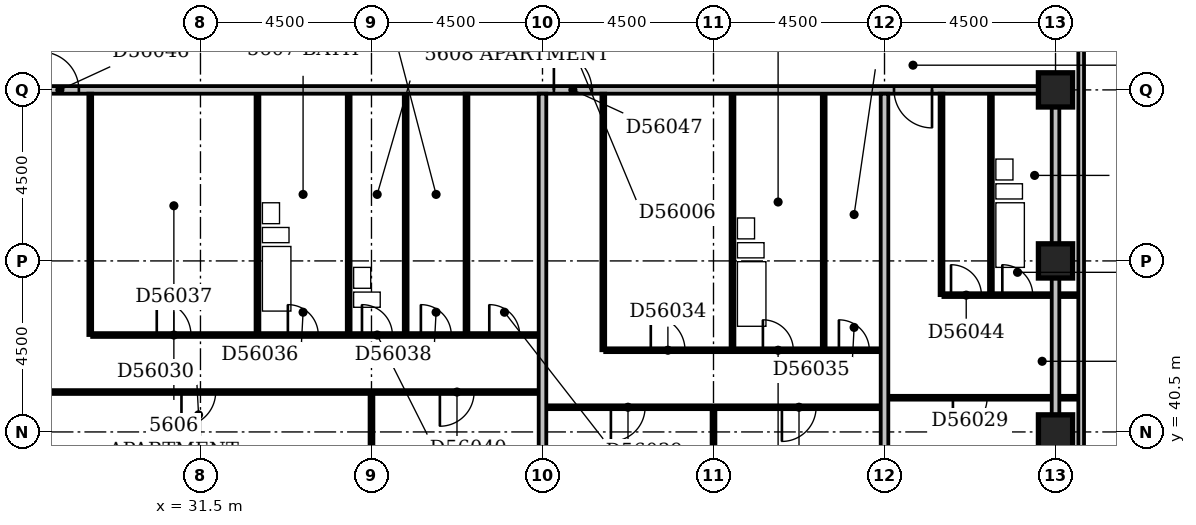
"""IFC4 building model, lengths in metres.
Left out: names, types, materials, properties, quantities, classifications, styles, units other than length and angle.
Written with IfcOpenShell. Run it as: python <this file> out.ifc"""

import sys

from ifc_helpers import new_model, si_unit, direction, frame, frame_2d, origin, origin_2d, place, context, subcontext, project, spatial, rectangle, extrude, element, fill, save


model = new_model("IFC4")
c1 = context("Model", 3, precision=1e-05, world=origin(), true_north=direction((0.0, 1.0)))
c2 = subcontext(c1, "Body", "Model", "MODEL_VIEW")
j1 = project(units=[si_unit("LENGTHUNIT", "METRE"), si_unit("PLANEANGLEUNIT", "RADIAN")], contexts=[c1])
p1 = place(None, origin())
s1 = spatial("IfcSite", under=j1, at=p1, CompositionType="ELEMENT")
p2 = place(p1, origin())
s2 = spatial("IfcBuilding", under=s1, at=p2, CompositionType="ELEMENT")
p3 = place(p2, frame((0.0, 0.0, 218.6)))
s3 = spatial("IfcBuildingStorey", under=s2, at=p3, CompositionType="ELEMENT", Elevation=218.6)
for number, where, z_axis, x_axis in (
    (1, (54.0, 40.5, -0.3), (0.0, 0.0, 1.0), (1.0, 0.0, 0.0)),
    (2, (54.0, 45.0, -0.3), (0.0, 0.0, 1.0), (1.0, 0.0, 0.0)),
    (3, (54.0, 49.5, -0.3), (0.0, 0.0, 1.0), (1.0, 0.0, 0.0)),
):
    element("IfcColumn", number, at=place(p3, frame(where, z_axis=z_axis, x_axis=x_axis)), inside=s3, PredefinedType="COLUMN", context=c2, shape_type="SweptSolid", body=[
        extrude(rectangle(XDim=0.9, YDim=0.9, at=origin_2d()), origin(), (0.0, 0.0, 1.0), 3.6),
    ])
p4 = place(p3, frame((54.675, 39.9, 0.0), z_axis=(0.0, 0.0, 1.0), x_axis=(0.0, 1.0, 0.0)))
e4 = element("IfcWall", 4, at=p4, inside=s3, PredefinedType="STANDARD", context=c2, shape_type="SweptSolid", body=[
    extrude(rectangle(XDim=14.85, YDim=0.15, at=frame_2d((7.425, 0.0))), origin(), (0.0, 0.0, 1.0), 2.7),
])
p5 = place(p3, frame((36.0, 36.45, 0.0), z_axis=(0.0, 0.0, 1.0), x_axis=(0.0, 1.0, 0.0)))
e5 = element("IfcWall", 5, at=p5, inside=s3, PredefinedType="PARTITIONING", context=c2, shape_type="SweptSolid", body=[
    extrude(rectangle(XDim=5.05, YDim=0.1, at=frame_2d((2.525, 0.0))), origin(), (0.0, 0.0, 1.0), 2.4),
])
p6 = place(p3, frame((40.5, 36.45, 0.0), z_axis=(0.0, 0.0, 1.0), x_axis=(0.0, 1.0, 0.0)))
e6 = element("IfcWall", 6, at=p6, inside=s3, PredefinedType="PARTITIONING", context=c2, shape_type="SweptSolid", body=[
    extrude(rectangle(XDim=12.95, YDim=0.2, at=frame_2d((6.475, 0.0))), origin(), (0.0, 0.0, 1.0), 3.3),
])
p7 = place(p3, frame((45.0, 36.45, 0.0), z_axis=(0.0, 0.0, 1.0), x_axis=(0.0, 1.0, 0.0)))
e7 = element("IfcWall", 7, at=p7, inside=s3, PredefinedType="PARTITIONING", context=c2, shape_type="SweptSolid", body=[
    extrude(rectangle(XDim=4.65, YDim=0.1, at=frame_2d((2.325, 0.0))), origin(), (0.0, 0.0, 1.0), 2.6),
])
p8 = place(p3, frame((49.5, 36.45, 0.0), z_axis=(0.0, 0.0, 1.0), x_axis=(0.0, 1.0, 0.0)))
e8 = element("IfcWall", 8, at=p8, inside=s3, PredefinedType="PARTITIONING", context=c2, shape_type="SweptSolid", body=[
    extrude(rectangle(XDim=12.95, YDim=0.2, at=frame_2d((6.475, 0.0))), origin(), (0.0, 0.0, 1.0), 3.3),
])
p9 = place(p3, frame((54.0, 40.95, 0.0), z_axis=(0.0, 0.0, 1.0), x_axis=(0.0, 1.0, 0.0)))
e9 = element("IfcWall", 9, at=p9, inside=s3, PredefinedType="PARTITIONING", context=c2, shape_type="SweptSolid", body=[
    extrude(rectangle(XDim=8.1, YDim=0.2, at=frame_2d((4.05, 0.0))), origin(), (0.0, 0.0, 1.0), 2.7),
])
p10 = place(p3, frame((40.6, 41.15, 0.0), z_axis=(0.0, 0.0, 1.0), x_axis=(1.0, 0.0, 0.0)))
e10 = element("IfcWall", 10, at=p10, inside=s3, PredefinedType="PARTITIONING", context=c2, shape_type="SweptSolid", body=[
    extrude(rectangle(XDim=8.8, YDim=0.1, at=frame_2d((4.4, 0.0))), origin(), (0.0, 0.0, 1.0), 3.3),
])
p11 = place(p10, frame((1.7, 0.0, 0.0)))
e11 = element("IfcOpeningElement", 11, at=p11, cuts=e10, PredefinedType="OPENING", context=c2, shape_type="SweptSolid", body=[
    extrude(rectangle(XDim=0.9, YDim=2.1, at=frame_2d((0.45, 1.05))), frame((0.0, 0.062, 0.0), z_axis=(0.0, -1.0, 0.0), x_axis=(1.0, 0.0, 0.0)), (0.0, 0.0, 1.0), 0.124),
])
p12 = place(p10, frame((6.2, 0.0, 0.0)))
e12 = element("IfcOpeningElement", 12, at=p12, cuts=e10, PredefinedType="OPENING", context=c2, shape_type="SweptSolid", body=[
    extrude(rectangle(XDim=0.9, YDim=2.1, at=frame_2d((0.45, 1.05))), frame((0.0, 0.062, 0.0), z_axis=(0.0, -1.0, 0.0), x_axis=(1.0, 0.0, 0.0)), (0.0, 0.0, 1.0), 0.124),
])
p13 = place(p3, frame((49.6, 41.4, 0.0), z_axis=(0.0, 0.0, 1.0), x_axis=(1.0, 0.0, 0.0)))
e13 = element("IfcWall", 13, at=p13, inside=s3, PredefinedType="PARTITIONING", context=c2, shape_type="SweptSolid", body=[
    extrude(rectangle(XDim=5.0, YDim=0.1, at=frame_2d((2.5, 0.0))), origin(), (0.0, 0.0, 1.0), 3.3),
])
p14 = place(p13, frame((1.7, 0.0, 0.0)))
e14 = element("IfcOpeningElement", 14, at=p14, cuts=e13, PredefinedType="OPENING", context=c2, shape_type="SweptSolid", body=[
    extrude(rectangle(XDim=0.9, YDim=2.1, at=frame_2d((0.45, 1.05))), frame((0.0, 0.062, 0.0), z_axis=(0.0, -1.0, 0.0), x_axis=(1.0, 0.0, 0.0)), (0.0, 0.0, 1.0), 0.124),
])
p15 = place(p3, frame((27.1, 41.55, 0.0), z_axis=(0.0, 0.0, 1.0), x_axis=(1.0, 0.0, 0.0)))
e15 = element("IfcWall", 15, at=p15, inside=s3, PredefinedType="PARTITIONING", context=c2, shape_type="SweptSolid", body=[
    extrude(rectangle(XDim=13.3, YDim=0.1, at=frame_2d((6.65, 0.0))), origin(), (0.0, 0.0, 1.0), 3.3),
])
p16 = place(p15, frame((3.9, 0.0, 0.0)))
e16 = element("IfcOpeningElement", 16, at=p16, cuts=e15, PredefinedType="OPENING", context=c2, shape_type="SweptSolid", body=[
    extrude(rectangle(XDim=0.9, YDim=2.1, at=frame_2d((0.45, 1.05))), frame((0.0, 0.062, 0.0), z_axis=(0.0, -1.0, 0.0), x_axis=(1.0, 0.0, 0.0)), (0.0, 0.0, 1.0), 0.124),
])
p17 = place(p15, frame((10.7, 0.0, 0.0)))
e17 = element("IfcOpeningElement", 17, at=p17, cuts=e15, PredefinedType="OPENING", context=c2, shape_type="SweptSolid", body=[
    extrude(rectangle(XDim=0.9, YDim=2.1, at=frame_2d((0.45, 1.05))), frame((0.0, 0.062, 0.0), z_axis=(0.0, -1.0, 0.0), x_axis=(1.0, 0.0, 0.0)), (0.0, 0.0, 1.0), 0.124),
])
p18 = place(p3, frame((42.1, 42.65, 0.0), z_axis=(0.0, 0.0, 1.0), x_axis=(0.0, 1.0, 0.0)))
e18 = element("IfcWall", 18, at=p18, inside=s3, PredefinedType="PARTITIONING", context=c2, shape_type="SweptSolid", body=[
    extrude(rectangle(XDim=6.75, YDim=0.1, at=frame_2d((3.375, 0.0))), origin(), (0.0, 0.0, 1.0), 3.3),
])
p19 = place(p3, frame((42.15, 42.65, 0.0), z_axis=(0.0, 0.0, 1.0), x_axis=(1.0, 0.0, 0.0)))
e19 = element("IfcWall", 19, at=p19, inside=s3, PredefinedType="PARTITIONING", context=c2, shape_type="SweptSolid", body=[
    extrude(rectangle(XDim=7.25, YDim=0.1, at=frame_2d((3.625, 0.0))), origin(), (0.0, 0.0, 1.0), 3.3),
])
p20 = place(p19, frame((4.15, 0.0, 0.0)))
e20 = element("IfcOpeningElement", 20, at=p20, cuts=e19, PredefinedType="OPENING", context=c2, shape_type="SweptSolid", body=[
    extrude(rectangle(XDim=0.8, YDim=2.1, at=frame_2d((0.4, 1.05))), frame((0.0, 0.062, 0.0), z_axis=(0.0, -1.0, 0.0), x_axis=(1.0, 0.0, 0.0)), (0.0, 0.0, 1.0), 0.124),
])
p21 = place(p19, frame((1.2, 0.0, 0.0)))
e21 = element("IfcOpeningElement", 21, at=p21, cuts=e19, PredefinedType="OPENING", context=c2, shape_type="SweptSolid", body=[
    extrude(rectangle(XDim=0.9, YDim=2.1, at=frame_2d((0.45, 1.05))), frame((0.0, 0.062, 0.0), z_axis=(0.0, -1.0, 0.0), x_axis=(1.0, 0.0, 0.0)), (0.0, 0.0, 1.0), 0.124),
])
p22 = place(p19, frame((6.15, 0.0, 0.0)))
e22 = element("IfcOpeningElement", 22, at=p22, cuts=e19, PredefinedType="OPENING", context=c2, shape_type="SweptSolid", body=[
    extrude(rectangle(XDim=0.8, YDim=2.1, at=frame_2d((0.4, 1.05))), frame((0.0, 0.062, 0.0), z_axis=(0.0, -1.0, 0.0), x_axis=(1.0, 0.0, 0.0)), (0.0, 0.0, 1.0), 0.124),
])
p23 = place(p3, frame((45.5, 42.7, 0.0), z_axis=(0.0, 0.0, 1.0), x_axis=(0.0, 1.0, 0.0)))
e23 = element("IfcWall", 23, at=p23, inside=s3, PredefinedType="PLUMBINGWALL", context=c2, shape_type="SweptSolid", body=[
    extrude(rectangle(XDim=6.7, YDim=0.1, at=frame_2d((3.35, 0.0))), origin(), (0.0, 0.0, 1.0), 2.6),
])
p24 = place(p3, frame((47.9, 42.7, 0.0), z_axis=(0.0, 0.0, 1.0), x_axis=(0.0, 1.0, 0.0)))
e24 = element("IfcWall", 24, at=p24, inside=s3, PredefinedType="PLUMBINGWALL", context=c2, shape_type="SweptSolid", body=[
    extrude(rectangle(XDim=6.7, YDim=0.1, at=frame_2d((3.35, 0.0))), origin(), (0.0, 0.0, 1.0), 3.3),
])
p25 = place(p3, frame((28.6, 43.05, 0.0), z_axis=(0.0, 0.0, 1.0), x_axis=(0.0, 1.0, 0.0)))
e25 = element("IfcWall", 25, at=p25, inside=s3, PredefinedType="PARTITIONING", context=c2, shape_type="SweptSolid", body=[
    extrude(rectangle(XDim=6.35, YDim=0.1, at=frame_2d((3.175, 0.0))), origin(), (0.0, 0.0, 1.0), 3.3),
])
p26 = place(p3, frame((28.65, 43.05, 0.0), z_axis=(0.0, 0.0, 1.0), x_axis=(1.0, 0.0, 0.0)))
e26 = element("IfcWall", 26, at=p26, inside=s3, PredefinedType="PARTITIONING", context=c2, shape_type="SweptSolid", body=[
    extrude(rectangle(XDim=11.75, YDim=0.1, at=frame_2d((5.875, 0.0))), origin(), (0.0, 0.0, 1.0), 3.3),
])
p27 = place(p26, frame((5.15, 0.0, 0.0)))
e27 = element("IfcOpeningElement", 27, at=p27, cuts=e26, PredefinedType="OPENING", context=c2, shape_type="SweptSolid", body=[
    extrude(rectangle(XDim=0.8, YDim=2.1, at=frame_2d((0.4, 1.05))), frame((0.0, 0.062, 0.0), z_axis=(0.0, -1.0, 0.0), x_axis=(1.0, 0.0, 0.0)), (0.0, 0.0, 1.0), 0.124),
])
p28 = place(p26, frame((1.7, 0.0, 0.0)))
e28 = element("IfcOpeningElement", 28, at=p28, cuts=e26, PredefinedType="OPENING", context=c2, shape_type="SweptSolid", body=[
    extrude(rectangle(XDim=0.9, YDim=2.1, at=frame_2d((0.45, 1.05))), frame((0.0, 0.062, 0.0), z_axis=(0.0, -1.0, 0.0), x_axis=(1.0, 0.0, 0.0)), (0.0, 0.0, 1.0), 0.124),
])
p29 = place(p26, frame((8.65, 0.0, 0.0)))
e29 = element("IfcOpeningElement", 29, at=p29, cuts=e26, PredefinedType="OPENING", context=c2, shape_type="SweptSolid", body=[
    extrude(rectangle(XDim=0.8, YDim=2.1, at=frame_2d((0.4, 1.05))), frame((0.0, 0.062, 0.0), z_axis=(0.0, -1.0, 0.0), x_axis=(1.0, 0.0, 0.0)), (0.0, 0.0, 1.0), 0.124),
])
p30 = place(p26, frame((10.45, 0.0, 0.0)))
e30 = element("IfcOpeningElement", 30, at=p30, cuts=e26, PredefinedType="OPENING", context=c2, shape_type="SweptSolid", body=[
    extrude(rectangle(XDim=0.8, YDim=2.1, at=frame_2d((0.4, 1.05))), frame((0.0, 0.062, 0.0), z_axis=(0.0, -1.0, 0.0), x_axis=(1.0, 0.0, 0.0)), (0.0, 0.0, 1.0), 0.124),
])
p31 = place(p26, frame((7.1, 0.0, 0.0)))
e31 = element("IfcOpeningElement", 31, at=p31, cuts=e26, PredefinedType="OPENING", context=c2, shape_type="SweptSolid", body=[
    extrude(rectangle(XDim=0.8, YDim=2.1, at=frame_2d((0.4, 1.05))), frame((0.0, 0.062, 0.0), z_axis=(0.0, -1.0, 0.0), x_axis=(1.0, 0.0, 0.0)), (0.0, 0.0, 1.0), 0.124),
])
p32 = place(p3, frame((33.0, 43.1, 0.0), z_axis=(0.0, 0.0, 1.0), x_axis=(0.0, 1.0, 0.0)))
e32 = element("IfcWall", 32, at=p32, inside=s3, PredefinedType="PLUMBINGWALL", context=c2, shape_type="SweptSolid", body=[
    extrude(rectangle(XDim=6.3, YDim=0.1, at=frame_2d((3.15, 0.0))), origin(), (0.0, 0.0, 1.0), 3.3),
])
p33 = place(p3, frame((35.4, 43.1, 0.0), z_axis=(0.0, 0.0, 1.0), x_axis=(0.0, 1.0, 0.0)))
e33 = element("IfcWall", 33, at=p33, inside=s3, PredefinedType="PLUMBINGWALL", context=c2, shape_type="SweptSolid", body=[
    extrude(rectangle(XDim=6.3, YDim=0.1, at=frame_2d((3.15, 0.0))), origin(), (0.0, 0.0, 1.0), 2.4),
])
p34 = place(p3, frame((36.9, 43.1, 0.0), z_axis=(0.0, 0.0, 1.0), x_axis=(0.0, 1.0, 0.0)))
e34 = element("IfcWall", 34, at=p34, inside=s3, PredefinedType="PLUMBINGWALL", context=c2, shape_type="SweptSolid", body=[
    extrude(rectangle(XDim=6.3, YDim=0.1, at=frame_2d((3.15, 0.0))), origin(), (0.0, 0.0, 1.0), 3.3),
])
p35 = place(p3, frame((38.5, 43.1, 0.0), z_axis=(0.0, 0.0, 1.0), x_axis=(0.0, 1.0, 0.0)))
e35 = element("IfcWall", 35, at=p35, inside=s3, PredefinedType="PARTITIONING", context=c2, shape_type="SweptSolid", body=[
    extrude(rectangle(XDim=6.3, YDim=0.1, at=frame_2d((3.15, 0.0))), origin(), (0.0, 0.0, 1.0), 3.3),
])
p36 = place(p3, frame((51.0, 44.1, 0.0), z_axis=(0.0, 0.0, 1.0), x_axis=(0.0, 1.0, 0.0)))
e36 = element("IfcWall", 36, at=p36, inside=s3, PredefinedType="PARTITIONING", context=c2, shape_type="SweptSolid", body=[
    extrude(rectangle(XDim=5.3, YDim=0.1, at=frame_2d((2.65, 0.0))), origin(), (0.0, 0.0, 1.0), 3.3),
])
p37 = place(p3, frame((51.05, 44.1, 0.0), z_axis=(0.0, 0.0, 1.0), x_axis=(1.0, 0.0, 0.0)))
e37 = element("IfcWall", 37, at=p37, inside=s3, PredefinedType="PARTITIONING", context=c2, shape_type="SweptSolid", body=[
    extrude(rectangle(XDim=3.55, YDim=0.1, at=frame_2d((1.775, 0.0))), origin(), (0.0, 0.0, 1.0), 3.3),
])
p38 = place(p37, frame((1.55, 0.0, 0.0)))
e38 = element("IfcOpeningElement", 38, at=p38, cuts=e37, PredefinedType="OPENING", context=c2, shape_type="SweptSolid", body=[
    extrude(rectangle(XDim=0.8, YDim=2.1, at=frame_2d((0.4, 1.05))), frame((0.0, 0.062, 0.0), z_axis=(0.0, -1.0, 0.0), x_axis=(1.0, 0.0, 0.0)), (0.0, 0.0, 1.0), 0.124),
])
p39 = place(p37, frame((0.2, 0.0, 0.0)))
e39 = element("IfcOpeningElement", 39, at=p39, cuts=e37, PredefinedType="OPENING", context=c2, shape_type="SweptSolid", body=[
    extrude(rectangle(XDim=0.8, YDim=2.1, at=frame_2d((0.4, 1.05))), frame((0.0, 0.062, 0.0), z_axis=(0.0, -1.0, 0.0), x_axis=(1.0, 0.0, 0.0)), (0.0, 0.0, 1.0), 0.124),
])
p40 = place(p3, frame((52.3, 44.15, 0.0), z_axis=(0.0, 0.0, 1.0), x_axis=(0.0, 1.0, 0.0)))
e40 = element("IfcWall", 40, at=p40, inside=s3, PredefinedType="PLUMBINGWALL", context=c2, shape_type="SweptSolid", body=[
    extrude(rectangle(XDim=5.25, YDim=0.1, at=frame_2d((2.625, 0.0))), origin(), (0.0, 0.0, 1.0), 3.3),
])
p41 = place(p3, frame((22.6, 49.5, 0.0), z_axis=(0.0, 0.0, 1.0), x_axis=(1.0, 0.0, 0.0)))
e41 = element("IfcWall", 41, at=p41, inside=s3, PredefinedType="PARTITIONING", context=c2, shape_type="SweptSolid", body=[
    extrude(rectangle(XDim=30.95, YDim=0.2, at=frame_2d((15.475, 0.0))), origin(), (0.0, 0.0, 1.0), 3.3),
])
p42 = place(p41, frame((1.85, 0.0, 0.0)))
e42 = element("IfcOpeningElement", 42, at=p42, cuts=e41, PredefinedType="OPENING", context=c2, shape_type="SweptSolid", body=[
    extrude(rectangle(XDim=1.0, YDim=2.1, at=frame_2d((0.5, 1.05))), frame((0.0, 0.112, 0.0), z_axis=(0.0, -1.0, 0.0), x_axis=(1.0, 0.0, 0.0)), (0.0, 0.0, 1.0), 0.224),
])
p43 = place(p41, frame((4.7, 0.0, 0.0)))
e43 = element("IfcOpeningElement", 43, at=p43, cuts=e41, PredefinedType="OPENING", context=c2, shape_type="SweptSolid", body=[
    extrude(rectangle(XDim=1.0, YDim=2.1, at=frame_2d((0.5, 1.05))), frame((0.0, 0.112, 0.0), z_axis=(0.0, -1.0, 0.0), x_axis=(1.0, 0.0, 0.0)), (0.0, 0.0, 1.0), 0.224),
])
p44 = place(p41, frame((18.2, 0.0, 0.0)))
e44 = element("IfcOpeningElement", 44, at=p44, cuts=e41, PredefinedType="OPENING", context=c2, shape_type="SweptSolid", body=[
    extrude(rectangle(XDim=1.0, YDim=2.1, at=frame_2d((0.5, 1.05))), frame((0.0, 0.112, 0.0), z_axis=(0.0, -1.0, 0.0), x_axis=(1.0, 0.0, 0.0)), (0.0, 0.0, 1.0), 0.224),
])
p45 = place(p41, frame((27.15, 0.0, 0.0)))
e45 = element("IfcOpeningElement", 45, at=p45, cuts=e41, PredefinedType="OPENING", context=c2, shape_type="SweptSolid", body=[
    extrude(rectangle(XDim=1.0, YDim=2.1, at=frame_2d((0.5, 1.05))), frame((0.0, 0.112, 0.0), z_axis=(0.0, -1.0, 0.0), x_axis=(1.0, 0.0, 0.0)), (0.0, 0.0, 1.0), 0.224),
])
p46 = place(p11, frame((0.9, 0.0, 0.0), z_axis=(0.0, 0.0, 1.0), x_axis=(-1.0, 0.0, 0.0)))
e46 = element("IfcDoor", 46, at=p46, inside=s3, OperationType="SINGLE_SWING_RIGHT", PredefinedType="DOOR", context=c2, shape_type="SweptSolid", body=[
    extrude(rectangle(XDim=0.9, YDim=2.1, at=frame_2d((0.45, 1.05))), frame((0.0, 0.025, 0.0), z_axis=(0.0, -1.0, 0.0), x_axis=(1.0, 0.0, 0.0)), (0.0, 0.0, 1.0), 0.05),
])
fill(e11, e46)
p47 = place(p12, frame((0.9, 0.0, 0.0), z_axis=(0.0, 0.0, 1.0), x_axis=(-1.0, 0.0, 0.0)))
e47 = element("IfcDoor", 47, at=p47, inside=s3, OperationType="SINGLE_SWING_RIGHT", PredefinedType="DOOR", context=c2, shape_type="SweptSolid", body=[
    extrude(rectangle(XDim=0.9, YDim=2.1, at=frame_2d((0.45, 1.05))), frame((0.0, 0.025, 0.0), z_axis=(0.0, -1.0, 0.0), x_axis=(1.0, 0.0, 0.0)), (0.0, 0.0, 1.0), 0.05),
])
fill(e12, e47)
p48 = place(p14, frame((0.9, 0.0, 0.0), z_axis=(0.0, 0.0, 1.0), x_axis=(-1.0, 0.0, 0.0)))
e48 = element("IfcDoor", 48, at=p48, inside=s3, OperationType="SINGLE_SWING_RIGHT", PredefinedType="DOOR", context=c2, shape_type="SweptSolid", body=[
    extrude(rectangle(XDim=0.9, YDim=2.1, at=frame_2d((0.45, 1.05))), frame((0.0, 0.025, 0.0), z_axis=(0.0, -1.0, 0.0), x_axis=(1.0, 0.0, 0.0)), (0.0, 0.0, 1.0), 0.05),
])
fill(e14, e48)
p49 = place(p16, frame((0.9, 0.0, 0.0), z_axis=(0.0, 0.0, 1.0), x_axis=(-1.0, 0.0, 0.0)))
e49 = element("IfcDoor", 49, at=p49, inside=s3, OperationType="SINGLE_SWING_RIGHT", PredefinedType="DOOR", context=c2, shape_type="SweptSolid", body=[
    extrude(rectangle(XDim=0.9, YDim=2.1, at=frame_2d((0.45, 1.05))), frame((0.0, 0.025, 0.0), z_axis=(0.0, -1.0, 0.0), x_axis=(1.0, 0.0, 0.0)), (0.0, 0.0, 1.0), 0.05),
])
fill(e16, e49)
p50 = place(p17, frame((0.9, 0.0, 0.0), z_axis=(0.0, 0.0, 1.0), x_axis=(-1.0, 0.0, 0.0)))
e50 = element("IfcDoor", 50, at=p50, inside=s3, OperationType="SINGLE_SWING_RIGHT", PredefinedType="DOOR", context=c2, shape_type="SweptSolid", body=[
    extrude(rectangle(XDim=0.9, YDim=2.1, at=frame_2d((0.45, 1.05))), frame((0.0, 0.025, 0.0), z_axis=(0.0, -1.0, 0.0), x_axis=(1.0, 0.0, 0.0)), (0.0, 0.0, 1.0), 0.05),
])
fill(e17, e50)
p51 = place(p20, origin())
e51 = element("IfcDoor", 51, at=p51, inside=s3, OperationType="SINGLE_SWING_LEFT", PredefinedType="DOOR", context=c2, shape_type="SweptSolid", body=[
    extrude(rectangle(XDim=0.8, YDim=2.1, at=frame_2d((0.4, 1.05))), frame((0.0, 0.025, 0.0), z_axis=(0.0, -1.0, 0.0), x_axis=(1.0, 0.0, 0.0)), (0.0, 0.0, 1.0), 0.05),
])
fill(e20, e51)
p52 = place(p21, origin())
e52 = element("IfcDoor", 52, at=p52, inside=s3, OperationType="SINGLE_SWING_LEFT", PredefinedType="DOOR", context=c2, shape_type="SweptSolid", body=[
    extrude(rectangle(XDim=0.9, YDim=2.1, at=frame_2d((0.45, 1.05))), frame((0.0, 0.025, 0.0), z_axis=(0.0, -1.0, 0.0), x_axis=(1.0, 0.0, 0.0)), (0.0, 0.0, 1.0), 0.05),
])
fill(e21, e52)
p53 = place(p22, origin())
e53 = element("IfcDoor", 53, at=p53, inside=s3, OperationType="SINGLE_SWING_LEFT", PredefinedType="DOOR", context=c2, shape_type="SweptSolid", body=[
    extrude(rectangle(XDim=0.8, YDim=2.1, at=frame_2d((0.4, 1.05))), frame((0.0, 0.025, 0.0), z_axis=(0.0, -1.0, 0.0), x_axis=(1.0, 0.0, 0.0)), (0.0, 0.0, 1.0), 0.05),
])
fill(e22, e53)
p54 = place(p27, origin())
e54 = element("IfcDoor", 54, at=p54, inside=s3, OperationType="SINGLE_SWING_LEFT", PredefinedType="DOOR", context=c2, shape_type="SweptSolid", body=[
    extrude(rectangle(XDim=0.8, YDim=2.1, at=frame_2d((0.4, 1.05))), frame((0.0, 0.025, 0.0), z_axis=(0.0, -1.0, 0.0), x_axis=(1.0, 0.0, 0.0)), (0.0, 0.0, 1.0), 0.05),
])
fill(e27, e54)
p55 = place(p28, origin())
e55 = element("IfcDoor", 55, at=p55, inside=s3, OperationType="SINGLE_SWING_LEFT", PredefinedType="DOOR", context=c2, shape_type="SweptSolid", body=[
    extrude(rectangle(XDim=0.9, YDim=2.1, at=frame_2d((0.45, 1.05))), frame((0.0, 0.025, 0.0), z_axis=(0.0, -1.0, 0.0), x_axis=(1.0, 0.0, 0.0)), (0.0, 0.0, 1.0), 0.05),
])
fill(e28, e55)
p56 = place(p29, origin())
e56 = element("IfcDoor", 56, at=p56, inside=s3, OperationType="SINGLE_SWING_LEFT", PredefinedType="DOOR", context=c2, shape_type="SweptSolid", body=[
    extrude(rectangle(XDim=0.8, YDim=2.1, at=frame_2d((0.4, 1.05))), frame((0.0, 0.025, 0.0), z_axis=(0.0, -1.0, 0.0), x_axis=(1.0, 0.0, 0.0)), (0.0, 0.0, 1.0), 0.05),
])
fill(e29, e56)
p57 = place(p30, origin())
e57 = element("IfcDoor", 57, at=p57, inside=s3, OperationType="SINGLE_SWING_LEFT", PredefinedType="DOOR", context=c2, shape_type="SweptSolid", body=[
    extrude(rectangle(XDim=0.8, YDim=2.1, at=frame_2d((0.4, 1.05))), frame((0.0, 0.025, 0.0), z_axis=(0.0, -1.0, 0.0), x_axis=(1.0, 0.0, 0.0)), (0.0, 0.0, 1.0), 0.05),
])
fill(e30, e57)
p58 = place(p31, origin())
e58 = element("IfcDoor", 58, at=p58, inside=s3, OperationType="SINGLE_SWING_LEFT", PredefinedType="DOOR", context=c2, shape_type="SweptSolid", body=[
    extrude(rectangle(XDim=0.8, YDim=2.1, at=frame_2d((0.4, 1.05))), frame((0.0, 0.025, 0.0), z_axis=(0.0, -1.0, 0.0), x_axis=(1.0, 0.0, 0.0)), (0.0, 0.0, 1.0), 0.05),
])
fill(e31, e58)
p59 = place(p38, origin())
e59 = element("IfcDoor", 59, at=p59, inside=s3, OperationType="SINGLE_SWING_LEFT", PredefinedType="DOOR", context=c2, shape_type="SweptSolid", body=[
    extrude(rectangle(XDim=0.8, YDim=2.1, at=frame_2d((0.4, 1.05))), frame((0.0, 0.025, 0.0), z_axis=(0.0, -1.0, 0.0), x_axis=(1.0, 0.0, 0.0)), (0.0, 0.0, 1.0), 0.05),
])
fill(e38, e59)
p60 = place(p39, origin())
e60 = element("IfcDoor", 60, at=p60, inside=s3, OperationType="SINGLE_SWING_LEFT", PredefinedType="DOOR", context=c2, shape_type="SweptSolid", body=[
    extrude(rectangle(XDim=0.8, YDim=2.1, at=frame_2d((0.4, 1.05))), frame((0.0, 0.025, 0.0), z_axis=(0.0, -1.0, 0.0), x_axis=(1.0, 0.0, 0.0)), (0.0, 0.0, 1.0), 0.05),
])
fill(e39, e60)
p61 = place(p43, origin())
e61 = element("IfcDoor", 61, at=p61, inside=s3, OperationType="SINGLE_SWING_LEFT", PredefinedType="DOOR", context=c2, shape_type="SweptSolid", body=[
    extrude(rectangle(XDim=1.0, YDim=2.1, at=frame_2d((0.5, 1.05))), frame((0.0, 0.025, 0.0), z_axis=(0.0, -1.0, 0.0), x_axis=(1.0, 0.0, 0.0)), (0.0, 0.0, 1.0), 0.05),
])
fill(e43, e61)
p62 = place(p44, origin())
e62 = element("IfcDoor", 62, at=p62, inside=s3, OperationType="SINGLE_SWING_LEFT", PredefinedType="DOOR", context=c2, shape_type="SweptSolid", body=[
    extrude(rectangle(XDim=1.0, YDim=2.1, at=frame_2d((0.5, 1.05))), frame((0.0, 0.025, 0.0), z_axis=(0.0, -1.0, 0.0), x_axis=(1.0, 0.0, 0.0)), (0.0, 0.0, 1.0), 0.05),
])
fill(e44, e62)
p63 = place(p45, origin())
e63 = element("IfcDoor", 63, at=p63, inside=s3, OperationType="SINGLE_SWING_RIGHT", PredefinedType="DOOR", context=c2, shape_type="SweptSolid", body=[
    extrude(rectangle(XDim=1.0, YDim=2.1, at=frame_2d((0.5, 1.05))), frame((0.0, 0.025, 0.0), z_axis=(0.0, -1.0, 0.0), x_axis=(1.0, 0.0, 0.0)), (0.0, 0.0, 1.0), 0.05),
])
fill(e45, e63)
save(model, sys.argv[1])
